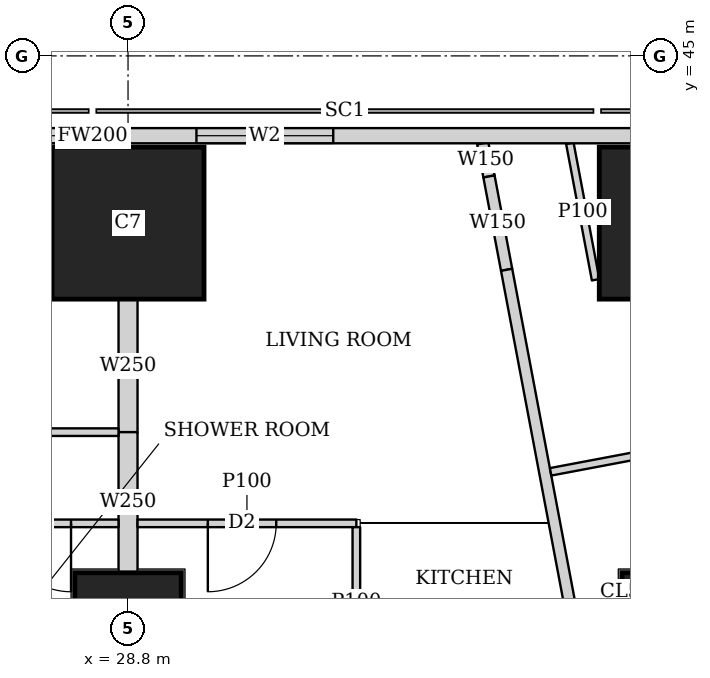
"""IFC4 building model, lengths in metres.
Left out: names, types, materials, properties, quantities, classifications, styles, units other than length and angle.
Written with IfcOpenShell. Run it as: python <this file> out.ifc"""

import sys

from ifc_helpers import new_model, si_unit, direction, frame, frame_2d, origin, origin_2d, place, context, subcontext, project, spatial, rectangle, extrude, element, fill, save


model = new_model("IFC4")
c1 = context("Model", 3, precision=1e-05, world=origin(), true_north=direction((0.0, 1.0)))
c2 = subcontext(c1, "Body", "Model", "MODEL_VIEW")
j1 = project(units=[si_unit("LENGTHUNIT", "METRE"), si_unit("PLANEANGLEUNIT", "RADIAN")], contexts=[c1])
p1 = place(None, origin())
s1 = spatial("IfcSite", under=j1, at=p1, CompositionType="ELEMENT")
p2 = place(p1, origin())
s2 = spatial("IfcBuilding", under=s1, at=p2, CompositionType="ELEMENT")
p3 = place(p2, frame((0.0, 0.0, 274.1)))
s3 = spatial("IfcBuildingStorey", under=s2, at=p3, CompositionType="ELEMENT", Elevation=274.1)
for number, where, z_axis, x_axis in (
    (1, (28.8, 37.5, 0.0), (0.0, 0.0, 1.0), (1.0, 0.0, 0.0)),
    (2, (36.0, 37.5, 0.0), (0.0, 0.0, 1.0), (1.0, 0.0, 0.0)),
):
    element("IfcColumn", number, at=place(p3, frame(where, z_axis=z_axis, x_axis=x_axis)), inside=s3, PredefinedType="COLUMN", context=c2, shape_type="SweptSolid", body=[
        extrude(rectangle(XDim=1.4, YDim=1.4, at=origin_2d()), origin(), (0.0, 0.0, 1.0), 3.75),
    ])
for number, where, z_axis, x_axis in (
    (3, (28.8, 42.8, 0.0), (0.0, 0.0, 1.0), (1.0, 0.0, 0.0)),
    (4, (36.0, 42.8, 0.0), (0.0, 0.0, 1.0), (1.0, 0.0, 0.0)),
):
    element("IfcColumn", number, at=place(p3, frame(where, z_axis=z_axis, x_axis=x_axis)), inside=s3, PredefinedType="COLUMN", context=c2, shape_type="SweptSolid", body=[
        extrude(rectangle(XDim=2.0, YDim=2.0, at=origin_2d()), origin(), (0.0, 0.0, 1.0), 3.75),
    ])
p4 = place(p3, frame((42.103, 43.95, 0.0), z_axis=(0.0, 0.0, 1.0), x_axis=(-1.0, 0.0, 0.0)))
e5 = element("IfcWall", 5, at=p4, inside=s3, PredefinedType="SOLIDWALL", context=c2, shape_type="SweptSolid", body=[
    extrude(rectangle(XDim=27.54, YDim=0.2, at=frame_2d((13.77, 0.0))), origin(), (0.0, 0.0, 1.0), 3.5),
])
p5 = place(p4, frame((10.603, 0.0, 0.9)))
e6 = element("IfcOpeningElement", 6, at=p5, cuts=e5, PredefinedType="OPENING", context=c2, shape_type="SweptSolid", body=[
    extrude(rectangle(XDim=1.8, YDim=1.5, at=frame_2d((0.9, 0.75))), frame((0.0, 0.11, 0.0), z_axis=(0.0, -1.0, 0.0), x_axis=(1.0, 0.0, 0.0)), (0.0, 0.0, 1.0), 0.22),
])
p6 = place(p4, frame((14.203, 0.0, 0.9)))
e7 = element("IfcOpeningElement", 7, at=p6, cuts=e5, PredefinedType="OPENING", context=c2, shape_type="SweptSolid", body=[
    extrude(rectangle(XDim=1.8, YDim=1.5, at=frame_2d((0.9, 0.75))), frame((0.0, 0.11, 0.0), z_axis=(0.0, -1.0, 0.0), x_axis=(1.0, 0.0, 0.0)), (0.0, 0.0, 1.0), 0.22),
])
p7 = place(p4, frame((17.803, 0.0, 0.9)))
e8 = element("IfcOpeningElement", 8, at=p7, cuts=e5, PredefinedType="OPENING", context=c2, shape_type="SweptSolid", body=[
    extrude(rectangle(XDim=1.8, YDim=1.5, at=frame_2d((0.9, 0.75))), frame((0.0, 0.11, 0.0), z_axis=(0.0, -1.0, 0.0), x_axis=(1.0, 0.0, 0.0)), (0.0, 0.0, 1.0), 0.22),
])
p8 = place(p4, frame((22.822, 0.0, 0.9)))
e9 = element("IfcOpeningElement", 9, at=p8, cuts=e5, PredefinedType="OPENING", context=c2, shape_type="SweptSolid", body=[
    extrude(rectangle(XDim=2.4, YDim=1.5, at=frame_2d((1.2, 0.75))), frame((0.0, 0.11, 0.0), z_axis=(0.0, -1.0, 0.0), x_axis=(1.0, 0.0, 0.0)), (0.0, 0.0, 1.0), 0.22),
])
p9 = place(p3, frame((33.467, 43.85, 0.0), z_axis=(0.0, 0.0, 1.0), x_axis=(0.184886516626, -0.982759877066, 0.0)))
e10 = element("IfcWall", 10, at=p9, inside=s3, PredefinedType="SOLIDWALL", context=c2, shape_type="SweptSolid", body=[
    extrude(rectangle(XDim=0.444, YDim=0.15, at=frame_2d((0.222, 0.0))), origin(), (0.0, 0.0, 1.0), 3.5),
])
p10 = place(p3, frame((33.549, 43.414, 0.0), z_axis=(0.0, 0.0, 1.0), x_axis=(0.185585816539, -0.982628060204, 0.0)))
e11 = element("IfcWall", 11, at=p10, inside=s3, PredefinedType="SOLIDWALL", context=c2, shape_type="SweptSolid", body=[
    extrude(rectangle(XDim=1.25, YDim=0.15, at=frame_2d((0.625, 0.0))), origin(), (0.0, 0.0, 1.0), 2.05),
])
p11 = place(p3, frame((33.781, 42.186, 0.0), z_axis=(0.0, 0.0, 1.0), x_axis=(0.185593518645, -0.9826266055, 0.0)))
e12 = element("IfcWall", 12, at=p11, inside=s3, PredefinedType="SOLIDWALL", context=c2, shape_type="SweptSolid", body=[
    extrude(rectangle(XDim=35.961, YDim=0.15, at=frame_2d((17.98, 0.0))), origin(), (0.0, 0.0, 1.0), 2.5),
])
p12 = place(p11, frame((11.76, 0.0, 0.0)))
e13 = element("IfcOpeningElement", 13, at=p12, cuts=e12, PredefinedType="OPENING", context=c2, shape_type="SweptSolid", body=[
    extrude(rectangle(XDim=1.0, YDim=2.1, at=frame_2d((0.5, 1.05))), frame((0.0, 0.085, 0.0), z_axis=(0.0, -1.0, 0.0), x_axis=(1.0, 0.0, 0.0)), (0.0, 0.0, 1.0), 0.17),
])
p13 = place(p11, frame((15.576, 0.0, 0.0)))
e14 = element("IfcOpeningElement", 14, at=p13, cuts=e12, PredefinedType="OPENING", context=c2, shape_type="SweptSolid", body=[
    extrude(rectangle(XDim=1.0, YDim=2.1, at=frame_2d((0.5, 1.05))), frame((0.0, 0.085, 0.0), z_axis=(0.0, -1.0, 0.0), x_axis=(1.0, 0.0, 0.0)), (0.0, 0.0, 1.0), 0.17),
])
p14 = place(p11, frame((30.502, 0.0, 0.0)))
e15 = element("IfcOpeningElement", 15, at=p14, cuts=e12, PredefinedType="OPENING", context=c2, shape_type="SweptSolid", body=[
    extrude(rectangle(XDim=1.0, YDim=2.1, at=frame_2d((0.5, 1.05))), frame((0.0, 0.085, 0.0), z_axis=(0.0, -1.0, 0.0), x_axis=(1.0, 0.0, 0.0)), (0.0, 0.0, 1.0), 0.17),
])
p15 = place(p3, frame((34.952, 42.055, 0.0), z_axis=(0.0, 0.0, 1.0), x_axis=(-0.185490642006, 0.98264603074, 0.0)))
e16 = element("IfcWall", 16, at=p15, inside=s3, PredefinedType="PARTITIONING", context=c2, shape_type="SweptSolid", body=[
    extrude(rectangle(XDim=1.827, YDim=0.1, at=frame_2d((0.914, 0.0))), origin(), (0.0, 0.0, 1.0), 2.05),
])
p16 = place(p3, frame((37.823, 40.182, 0.0), z_axis=(0.0, 0.0, 1.0), x_axis=(-0.98263926043, -0.185526504472, 0.0)))
e17 = element("IfcWall", 17, at=p16, inside=s3, PredefinedType="PARTITIONING", context=c2, shape_type="SweptSolid", body=[
    extrude(rectangle(XDim=3.524, YDim=0.1, at=frame_2d((1.762, 0.0))), origin(), (0.0, 0.0, 1.0), 3.5),
])
p17 = place(p3, frame((21.6, 40.05, 0.0), z_axis=(0.0, 0.0, 1.0), x_axis=(1.0, 0.0, 0.0)))
e18 = element("IfcWall", 18, at=p17, inside=s3, PredefinedType="PARTITIONING", context=c2, shape_type="SweptSolid", body=[
    extrude(rectangle(XDim=7.075, YDim=0.1, at=frame_2d((3.538, 0.0))), origin(), (0.0, 0.0, 1.0), 3.5),
])
p18 = place(p17, frame((0.2, 0.0, 0.0)))
e19 = element("IfcOpeningElement", 19, at=p18, cuts=e18, PredefinedType="OPENING", context=c2, shape_type="SweptSolid", body=[
    extrude(rectangle(XDim=0.9, YDim=2.1, at=frame_2d((0.45, 1.05))), frame((0.0, 0.06, 0.0), z_axis=(0.0, -1.0, 0.0), x_axis=(1.0, 0.0, 0.0)), (0.0, 0.0, 1.0), 0.12),
])
p19 = place(p17, frame((3.8, 0.0, 0.0)))
e20 = element("IfcOpeningElement", 20, at=p19, cuts=e18, PredefinedType="OPENING", context=c2, shape_type="SweptSolid", body=[
    extrude(rectangle(XDim=0.9, YDim=2.1, at=frame_2d((0.45, 1.05))), frame((0.0, 0.06, 0.0), z_axis=(0.0, -1.0, 0.0), x_axis=(1.0, 0.0, 0.0)), (0.0, 0.0, 1.0), 0.12),
])
p20 = place(p3, frame((21.6, 38.85, 0.0), z_axis=(0.0, 0.0, 1.0), x_axis=(1.0, 0.0, 0.0)))
e21 = element("IfcWall", 21, at=p20, inside=s3, PredefinedType="PARTITIONING", context=c2, shape_type="SweptSolid", body=[
    extrude(rectangle(XDim=7.075, YDim=0.1, at=frame_2d((3.538, 0.0))), origin(), (0.0, 0.0, 1.0), 3.5),
])
p21 = place(p20, frame((1.35, 0.0, 0.0)))
e22 = element("IfcOpeningElement", 22, at=p21, cuts=e21, PredefinedType="OPENING", context=c2, shape_type="SweptSolid", body=[
    extrude(rectangle(XDim=0.9, YDim=2.1, at=frame_2d((0.45, 1.05))), frame((0.0, 0.06, 0.0), z_axis=(0.0, -1.0, 0.0), x_axis=(1.0, 0.0, 0.0)), (0.0, 0.0, 1.0), 0.12),
])
p22 = place(p20, frame((5.55, 0.0, 0.0)))
e23 = element("IfcOpeningElement", 23, at=p22, cuts=e21, PredefinedType="OPENING", context=c2, shape_type="SweptSolid", body=[
    extrude(rectangle(XDim=0.9, YDim=2.1, at=frame_2d((0.45, 1.05))), frame((0.0, 0.06, 0.0), z_axis=(0.0, -1.0, 0.0), x_axis=(1.0, 0.0, 0.0)), (0.0, 0.0, 1.0), 0.12),
])
p23 = place(p3, frame((28.925, 38.85, 0.0), z_axis=(0.0, 0.0, 1.0), x_axis=(1.0, 0.0, 0.0)))
e24 = element("IfcWall", 24, at=p23, inside=s3, PredefinedType="PARTITIONING", context=c2, shape_type="SweptSolid", body=[
    extrude(rectangle(XDim=2.879, YDim=0.1, at=frame_2d((1.439, 0.0))), origin(), (0.0, 0.0, 1.0), 3.5),
])
p24 = place(p23, frame((0.925, 0.0, 0.0)))
e25 = element("IfcOpeningElement", 25, at=p24, cuts=e24, PredefinedType="OPENING", context=c2, shape_type="SweptSolid", body=[
    extrude(rectangle(XDim=0.9, YDim=2.1, at=frame_2d((0.45, 1.05))), frame((0.0, 0.06, 0.0), z_axis=(0.0, -1.0, 0.0), x_axis=(1.0, 0.0, 0.0)), (0.0, 0.0, 1.0), 0.12),
])
p25 = place(p3, frame((31.804, 36.825, 0.0), z_axis=(0.0, 0.0, 1.0), x_axis=(0.0, 1.0, 0.0)))
e26 = element("IfcWall", 26, at=p25, inside=s3, PredefinedType="PARTITIONING", context=c2, shape_type="SweptSolid", body=[
    extrude(rectangle(XDim=1.975, YDim=0.1, at=frame_2d((0.988, 0.0))), origin(), (0.0, 0.0, 1.0), 3.5),
])
p26 = place(p3, frame((28.8, 40.05, 0.0), z_axis=(0.0, 0.0, 1.0), x_axis=(0.0, 1.0, 0.0)))
e27 = element("IfcWall", 27, at=p26, inside=s3, PredefinedType="SOLIDWALL", context=c2, shape_type="SweptSolid", body=[
    extrude(rectangle(XDim=1.749, YDim=0.25, at=frame_2d((0.875, 0.0))), origin(), (0.0, 0.0, 1.0), 3.5),
])
p27 = place(p3, frame((28.8, 38.201, 0.0), z_axis=(0.0, 0.0, 1.0), x_axis=(0.0, 1.0, 0.0)))
e28 = element("IfcWall", 28, at=p27, inside=s3, PredefinedType="SOLIDWALL", context=c2, shape_type="SweptSolid", body=[
    extrude(rectangle(XDim=1.849, YDim=0.25, at=frame_2d((0.925, 0.0))), origin(), (0.0, 0.0, 1.0), 3.5),
])
p28 = place(p5, origin())
e29 = element("IfcWindow", 29, at=p28, inside=s3, PartitioningType="SINGLE_PANEL", PredefinedType="WINDOW", context=c2, shape_type="SweptSolid", body=[
    extrude(rectangle(XDim=1.8, YDim=1.5, at=frame_2d((0.9, 0.75))), frame((0.0, 0.03, 0.0), z_axis=(0.0, -1.0, 0.0), x_axis=(1.0, 0.0, 0.0)), (0.0, 0.0, 1.0), 0.06),
])
fill(e6, e29)
p29 = place(p6, origin())
e30 = element("IfcWindow", 30, at=p29, inside=s3, PartitioningType="SINGLE_PANEL", PredefinedType="WINDOW", context=c2, shape_type="SweptSolid", body=[
    extrude(rectangle(XDim=1.8, YDim=1.5, at=frame_2d((0.9, 0.75))), frame((0.0, 0.03, 0.0), z_axis=(0.0, -1.0, 0.0), x_axis=(1.0, 0.0, 0.0)), (0.0, 0.0, 1.0), 0.06),
])
fill(e7, e30)
p30 = place(p22, origin())
e31 = element("IfcDoor", 31, at=p30, inside=s3, OperationType="SINGLE_SWING_LEFT", PredefinedType="DOOR", context=c2, shape_type="SweptSolid", body=[
    extrude(rectangle(XDim=0.9, YDim=2.1, at=frame_2d((0.45, 1.05))), frame((0.0, 0.025, 0.0), z_axis=(0.0, -1.0, 0.0), x_axis=(1.0, 0.0, 0.0)), (0.0, 0.0, 1.0), 0.05),
])
fill(e23, e31)
p31 = place(p24, origin())
e32 = element("IfcDoor", 32, at=p31, inside=s3, OperationType="SINGLE_SWING_RIGHT", PredefinedType="DOOR", context=c2, shape_type="SweptSolid", body=[
    extrude(rectangle(XDim=0.9, YDim=2.1, at=frame_2d((0.45, 1.05))), frame((0.0, 0.025, 0.0), z_axis=(0.0, -1.0, 0.0), x_axis=(1.0, 0.0, 0.0)), (0.0, 0.0, 1.0), 0.05),
])
fill(e25, e32)
save(model, sys.argv[1])
